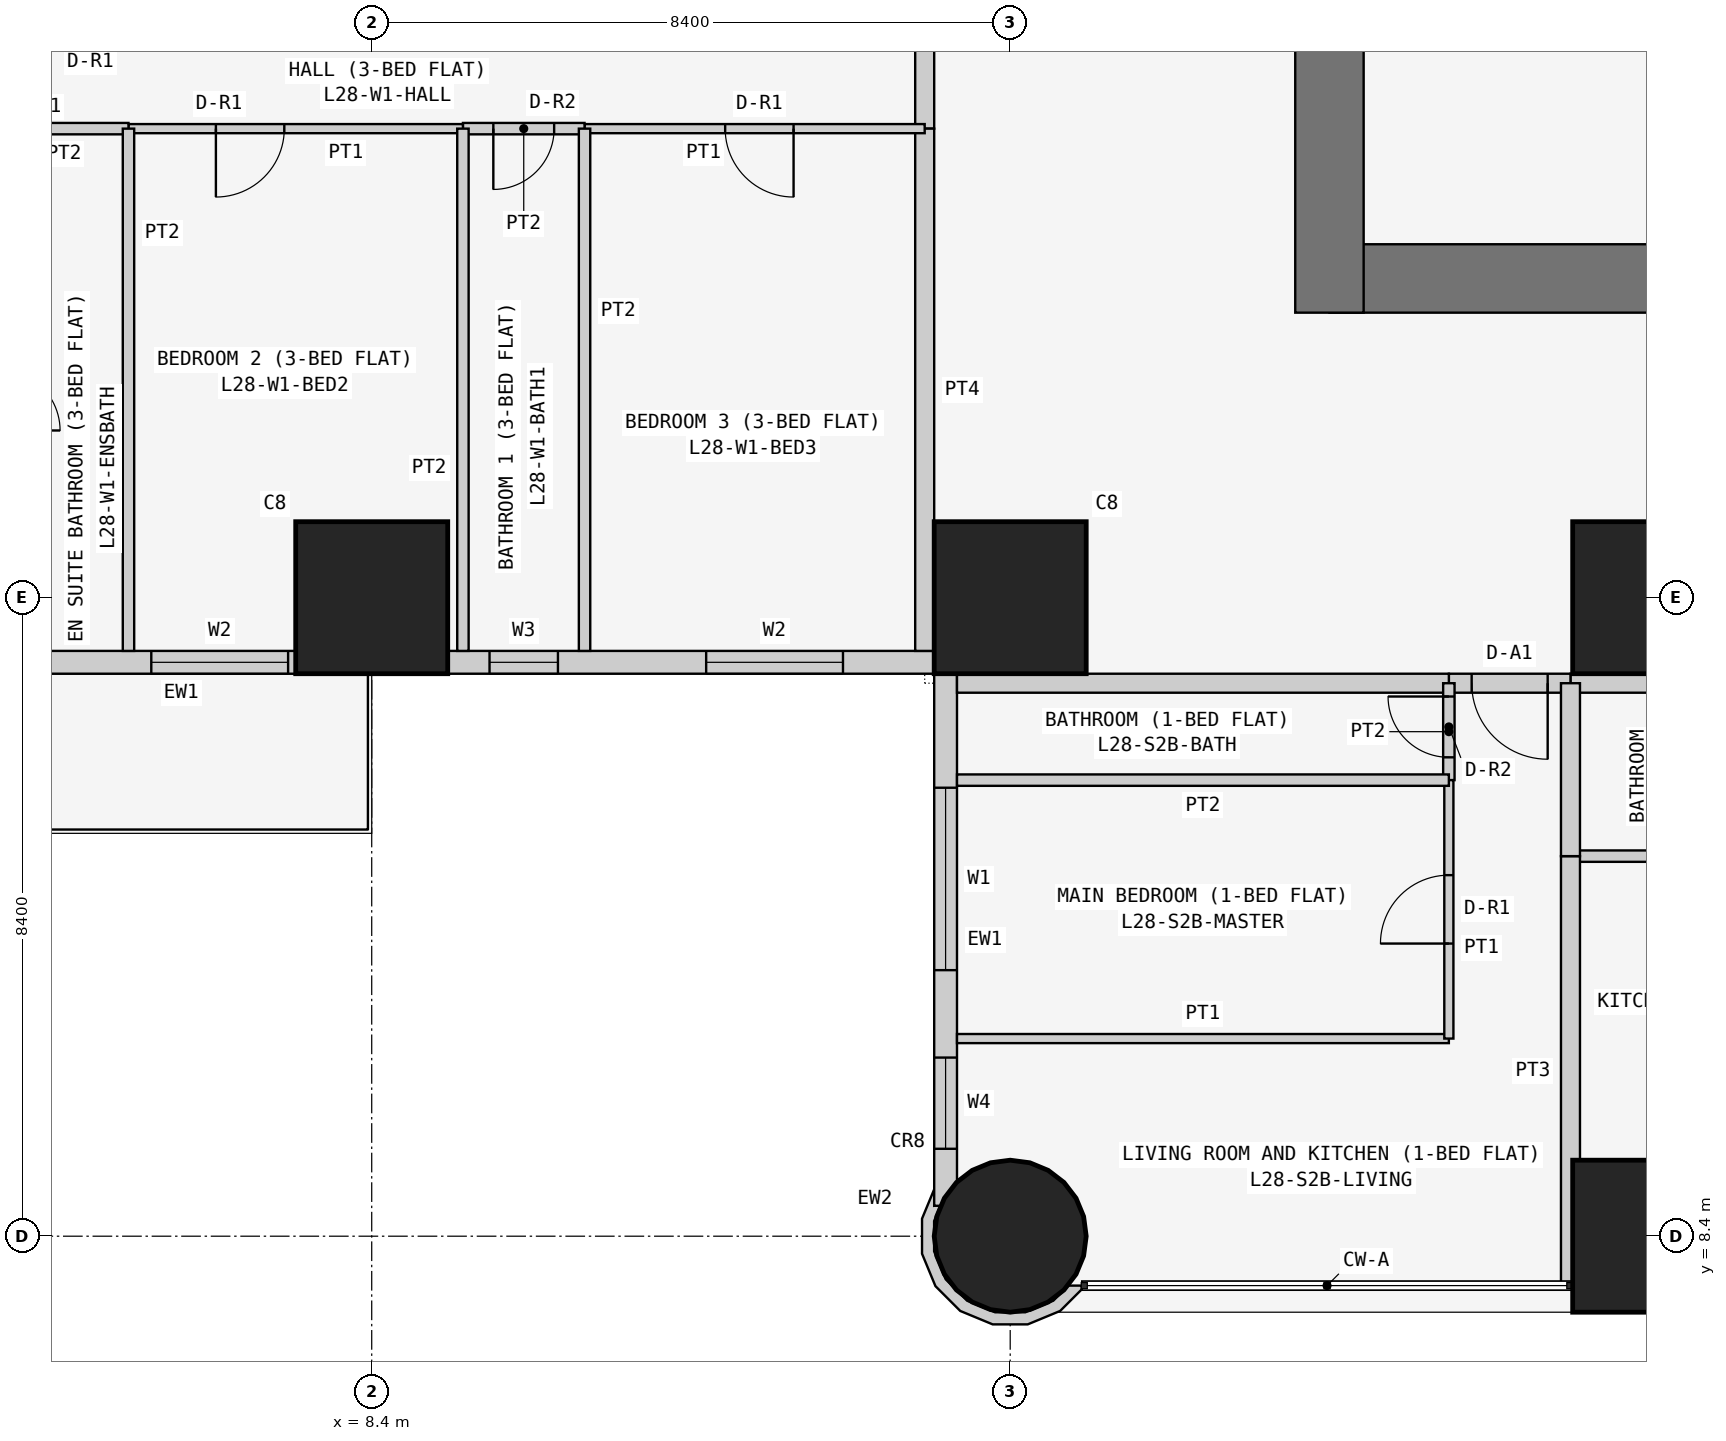
"""IFC4 building model, lengths in metres.
Left out: names, types, materials, properties, quantities, classifications, styles, units other than length and angle.
Written with IfcOpenShell. Run it as: python <this file> out.ifc"""

import sys

from ifc_helpers import new_model, si_unit, direction, frame, frame_2d, origin, origin_2d, place, context, subcontext, project, spatial, polyline, rectangle, circle, outline, extrude, element, fill, save


model = new_model("IFC4")
c1 = context("Model", 3, precision=1e-05, world=origin(), true_north=direction((0.0, 1.0)))
c2 = subcontext(c1, "Body", "Model", "MODEL_VIEW")
j1 = project(units=[si_unit("LENGTHUNIT", "METRE"), si_unit("PLANEANGLEUNIT", "RADIAN")], contexts=[c1])
p1 = place(None, origin())
s1 = spatial("IfcSite", under=j1, at=p1, CompositionType="ELEMENT")
p2 = place(p1, origin())
s2 = spatial("IfcBuilding", under=s1, at=p2, CompositionType="ELEMENT")
p3 = place(p2, frame((0.0, 0.0, 112.5)))
s3 = spatial("IfcBuildingStorey", under=s2, at=p3, CompositionType="ELEMENT", Elevation=112.5)
p4 = place(p3, frame((8.4, 16.8, 0.0), z_axis=(0.0, 0.0, 1.0), x_axis=(1.0, 0.0, 0.0)))
e1 = element("IfcColumn", 1, at=p4, inside=s3, PredefinedType="COLUMN", context=c2, shape_type="SweptSolid", body=[
    extrude(rectangle(XDim=2.0, YDim=2.0, at=origin_2d()), origin(), (0.0, 0.0, 1.0), 3.6),
])
p5 = place(p3, frame((16.8, 8.4, 0.0), z_axis=(0.0, 0.0, 1.0), x_axis=(1.0, 0.0, 0.0)))
e2 = element("IfcColumn", 2, at=p5, inside=s3, PredefinedType="COLUMN", context=c2, shape_type="SweptSolid", body=[
    extrude(circle(Radius=1.0, at=origin_2d()), origin(), (0.0, 0.0, 1.0), 3.6),
])
for number, where, z_axis, x_axis in (
    (3, (16.8, 16.8, 0.0), (0.0, 0.0, 1.0), (1.0, 0.0, 0.0)),
    (4, (25.2, 8.4, 0.0), (0.0, 0.0, 1.0), (1.0, 0.0, 0.0)),
    (5, (25.2, 16.8, 0.0), (0.0, 0.0, 1.0), (1.0, 0.0, 0.0)),
):
    element("IfcColumn", number, at=place(p3, frame(where, z_axis=z_axis, x_axis=x_axis)), inside=s3, PredefinedType="COLUMN", context=c2, shape_type="SweptSolid", body=[
        extrude(rectangle(XDim=2.0, YDim=2.0, at=origin_2d()), origin(), (0.0, 0.0, 1.0), 3.6),
    ])
p6 = place(p3, frame((21.0, 21.0, 0.0), z_axis=(0.0, 0.0, 1.0), x_axis=(1.0, 0.0, 0.0)))
e6 = element("IfcWall", 6, at=p6, inside=s3, PredefinedType="SHEAR", context=c2, shape_type="SweptSolid", body=[
    extrude(rectangle(XDim=17.25, YDim=0.9, at=frame_2d((8.625, 0.0))), origin(), (0.0, 0.0, 1.0), 3.6),
])
p7 = place(p3, frame((21.0, 37.8, 0.0), z_axis=(0.0, 0.0, 1.0), x_axis=(0.0, -1.0, 0.0)))
e7 = element("IfcWall", 7, at=p7, inside=s3, PredefinedType="SHEAR", context=c2, shape_type="SweptSolid", body=[
    extrude(rectangle(XDim=17.25, YDim=0.9, at=frame_2d((8.625, 0.0))), origin(), (0.0, 0.0, 1.0), 3.6),
])
p8 = place(p7, frame((5.4, 0.0, 0.0)))
e8 = element("IfcOpeningElement", 8, at=p8, cuts=e7, PredefinedType="OPENING", context=c2, shape_type="SweptSolid", body=[
    extrude(rectangle(XDim=1.2, YDim=2.1, at=frame_2d((0.6, 1.05))), frame((0.0, 0.46, 0.0), z_axis=(0.0, -1.0, 0.0), x_axis=(1.0, 0.0, 0.0)), (0.0, 0.0, 1.0), 0.92),
])
p9 = place(p3, frame((0.4, 15.95, 0.0), z_axis=(0.0, 0.0, 1.0), x_axis=(1.0, 0.0, 0.0)))
e9 = element("IfcWall", 9, at=p9, inside=s3, PredefinedType="SOLIDWALL", context=c2, shape_type="SweptSolid", body=[
    extrude(rectangle(XDim=15.7, YDim=0.3, at=frame_2d((7.85, 0.0))), origin(), (0.0, 0.0, 1.0), 3.45),
])
p10 = place(p9, frame((12.4, 0.0, 0.9)))
e10 = element("IfcOpeningElement", 10, at=p10, cuts=e9, PredefinedType="OPENING", context=c2, shape_type="SweptSolid", body=[
    extrude(rectangle(XDim=1.8, YDim=1.5, at=frame_2d((0.9, 0.75))), frame((0.0, 0.16, 0.0), z_axis=(0.0, -1.0, 0.0), x_axis=(1.0, 0.0, 0.0)), (0.0, 0.0, 1.0), 0.32),
])
p11 = place(p9, frame((9.55, 0.0, 1.5)))
e11 = element("IfcOpeningElement", 11, at=p11, cuts=e9, PredefinedType="OPENING", context=c2, shape_type="SweptSolid", body=[
    extrude(rectangle(XDim=0.9, YDim=0.7, at=frame_2d((0.45, 0.35))), frame((0.0, 0.16, 0.0), z_axis=(0.0, -1.0, 0.0), x_axis=(1.0, 0.0, 0.0)), (0.0, 0.0, 1.0), 0.32),
])
p12 = place(p9, frame((5.1, 0.0, 0.9)))
e12 = element("IfcOpeningElement", 12, at=p12, cuts=e9, PredefinedType="OPENING", context=c2, shape_type="SweptSolid", body=[
    extrude(rectangle(XDim=1.8, YDim=1.5, at=frame_2d((0.9, 0.75))), frame((0.0, 0.16, 0.0), z_axis=(0.0, -1.0, 0.0), x_axis=(1.0, 0.0, 0.0)), (0.0, 0.0, 1.0), 0.32),
])
p13 = place(p9, frame((2.0, 0.0, 0.0)))
e13 = element("IfcOpeningElement", 13, at=p13, cuts=e9, PredefinedType="OPENING", context=c2, shape_type="SweptSolid", body=[
    extrude(rectangle(XDim=0.9, YDim=2.4, at=frame_2d((0.45, 1.2))), frame((0.0, 0.16, 0.0), z_axis=(0.0, -1.0, 0.0), x_axis=(1.0, 0.0, 0.0)), (0.0, 0.0, 1.0), 0.32),
])
p14 = place(p9, frame((0.7, 0.0, 0.9)))
e14 = element("IfcOpeningElement", 14, at=p14, cuts=e9, PredefinedType="OPENING", context=c2, shape_type="SweptSolid", body=[
    extrude(rectangle(XDim=1.2, YDim=1.5, at=frame_2d((0.6, 0.75))), frame((0.0, 0.16, 0.0), z_axis=(0.0, -1.0, 0.0), x_axis=(1.0, 0.0, 0.0)), (0.0, 0.0, 1.0), 0.32),
])
p15 = place(p3, frame((15.95, 15.8, 0.0), z_axis=(0.0, 0.0, 1.0), x_axis=(0.0, -1.0, 0.0)))
e15 = element("IfcWall", 15, at=p15, inside=s3, PredefinedType="SOLIDWALL", context=c2, shape_type="SweptSolid", body=[
    extrude(rectangle(XDim=7.0, YDim=0.3, at=frame_2d((3.5, 0.0))), origin(), (0.0, 0.0, 1.0), 3.45),
])
p16 = place(p15, frame((1.5, 0.0, 0.9)))
e16 = element("IfcOpeningElement", 16, at=p16, cuts=e15, PredefinedType="OPENING", context=c2, shape_type="SweptSolid", body=[
    extrude(rectangle(XDim=2.4, YDim=1.5, at=frame_2d((1.2, 0.75))), frame((0.0, 0.16, 0.0), z_axis=(0.0, -1.0, 0.0), x_axis=(1.0, 0.0, 0.0)), (0.0, 0.0, 1.0), 0.32),
])
p17 = place(p15, frame((5.05, 0.0, 0.9)))
e17 = element("IfcOpeningElement", 17, at=p17, cuts=e15, PredefinedType="OPENING", context=c2, shape_type="SweptSolid", body=[
    extrude(rectangle(XDim=1.2, YDim=1.5, at=frame_2d((0.6, 0.75))), frame((0.0, 0.16, 0.0), z_axis=(0.0, -1.0, 0.0), x_axis=(1.0, 0.0, 0.0)), (0.0, 0.0, 1.0), 0.32),
])
p18 = place(p3, frame((15.881, 8.967, 0.0), z_axis=(0.0, 0.0, 1.0), x_axis=(-0.555974394895, -0.831199417842, 0.0)))
e18 = element("IfcWall", 18, at=p18, inside=s3, PredefinedType="SOLIDWALL", context=c2, shape_type="SweptSolid", body=[
    extrude(outline(polyline([(0.075, 2.077), (0.35, 2.022), (0.682, 1.801), (0.903, 1.47), (0.981, 1.08), (0.903, 0.689), (0.682, 0.358), (0.351, 0.137), (0.126, 0.092), (0.184, 0.026), (0.003, -0.095), (0.414, -0.013), (0.797, 0.243), (1.053, 0.627), (1.143, 1.08), (1.053, 1.532), (0.796, 1.916), (0.413, 2.172), (0.017, 2.251), (-0.023, 2.224), (0.075, 2.077)])), origin(), (0.0, 0.0, 1.0), 3.45),
])
p19 = place(p3, frame((26.8, 15.675, 0.0), z_axis=(0.0, 0.0, 1.0), x_axis=(-1.0, 0.0, 0.0)))
e19 = element("IfcWall", 19, at=p19, inside=s3, PredefinedType="PARTITIONING", context=c2, shape_type="SweptSolid", body=[
    extrude(rectangle(XDim=2.629, YDim=0.25, at=frame_2d((1.314, 0.0))), origin(), (0.0, 0.0, 1.0), 3.45),
])
p20 = place(p3, frame((24.171, 15.675, 0.0), z_axis=(0.0, 0.0, 1.0), x_axis=(-1.0, 0.0, 0.0)))
e20 = element("IfcWall", 20, at=p20, inside=s3, PredefinedType="PARTITIONING", context=c2, shape_type="SweptSolid", body=[
    extrude(rectangle(XDim=1.6, YDim=0.25, at=frame_2d((0.8, 0.0))), origin(), (0.0, 0.0, 1.0), 3.45),
])
p21 = place(p20, frame((0.3, 0.0, 0.0)))
e21 = element("IfcOpeningElement", 21, at=p21, cuts=e20, PredefinedType="OPENING", context=c2, shape_type="SweptSolid", body=[
    extrude(rectangle(XDim=1.0, YDim=2.1, at=frame_2d((0.5, 1.05))), frame((0.0, 0.135, 0.0), z_axis=(0.0, -1.0, 0.0), x_axis=(1.0, 0.0, 0.0)), (0.0, 0.0, 1.0), 0.27),
])
p22 = place(p3, frame((22.571, 15.675, 0.0), z_axis=(0.0, 0.0, 1.0), x_axis=(-1.0, 0.0, 0.0)))
e22 = element("IfcWall", 22, at=p22, inside=s3, PredefinedType="PARTITIONING", context=c2, shape_type="SweptSolid", body=[
    extrude(rectangle(XDim=6.471, YDim=0.25, at=frame_2d((3.235, 0.0))), origin(), (0.0, 0.0, 1.0), 3.45),
])
p23 = place(p3, frame((15.675, 22.971, 0.0), z_axis=(0.0, 0.0, 1.0), x_axis=(0.0, 1.0, 0.0)))
e23 = element("IfcWall", 23, at=p23, inside=s3, PredefinedType="PARTITIONING", context=c2, shape_type="SweptSolid", body=[
    extrude(rectangle(XDim=1.2, YDim=0.25, at=frame_2d((0.6, 0.0))), origin(), (0.0, 0.0, 1.0), 3.45),
])
p24 = place(p3, frame((15.675, 16.1, 0.0), z_axis=(0.0, 0.0, 1.0), x_axis=(0.0, 1.0, 0.0)))
e24 = element("IfcWall", 24, at=p24, inside=s3, PredefinedType="PARTITIONING", context=c2, shape_type="SweptSolid", body=[
    extrude(rectangle(XDim=6.871, YDim=0.25, at=frame_2d((3.436, 0.0))), origin(), (0.0, 0.0, 1.0), 3.45),
])
p25 = place(p3, frame((24.171, 13.4, 0.0), z_axis=(0.0, 0.0, 1.0), x_axis=(1.0, 0.0, 0.0)))
e25 = element("IfcWall", 25, at=p25, inside=s3, PredefinedType="PARTITIONING", context=c2, shape_type="SweptSolid", body=[
    extrude(rectangle(XDim=2.629, YDim=0.15, at=frame_2d((1.314, 0.0))), origin(), (0.0, 0.0, 1.0), 3.45),
])
p26 = place(p3, frame((24.171, 7.75, 0.0), z_axis=(0.0, 0.0, 1.0), x_axis=(0.0, 1.0, 0.0)))
e26 = element("IfcWall", 26, at=p26, inside=s3, PredefinedType="PARTITIONING", context=c2, shape_type="SweptSolid", body=[
    extrude(rectangle(XDim=5.65, YDim=0.25, at=frame_2d((2.825, 0.0))), origin(), (0.0, 0.0, 1.0), 3.45),
])
p27 = place(p3, frame((24.171, 13.4, 0.0), z_axis=(0.0, 0.0, 1.0), x_axis=(0.0, 1.0, 0.0)))
e27 = element("IfcWall", 27, at=p27, inside=s3, PredefinedType="PARTITIONING", context=c2, shape_type="SweptSolid", body=[
    extrude(rectangle(XDim=2.275, YDim=0.25, at=frame_2d((1.138, 0.0))), origin(), (0.0, 0.0, 1.0), 3.45),
])
p28 = place(p3, frame((22.571, 14.4, 0.0), z_axis=(0.0, 0.0, 1.0), x_axis=(0.0, 1.0, 0.0)))
e28 = element("IfcWall", 28, at=p28, inside=s3, PredefinedType="PARTITIONING", context=c2, shape_type="SweptSolid", body=[
    extrude(rectangle(XDim=1.275, YDim=0.15, at=frame_2d((0.638, 0.0))), origin(), (0.0, 0.0, 1.0), 3.45),
])
p29 = place(p28, frame((0.3, 0.0, 0.0)))
e29 = element("IfcOpeningElement", 29, at=p29, cuts=e28, PredefinedType="OPENING", context=c2, shape_type="SweptSolid", body=[
    extrude(rectangle(XDim=0.8, YDim=2.1, at=frame_2d((0.4, 1.05))), frame((0.0, 0.085, 0.0), z_axis=(0.0, -1.0, 0.0), x_axis=(1.0, 0.0, 0.0)), (0.0, 0.0, 1.0), 0.17),
])
p30 = place(p3, frame((16.1, 11.0, 0.0), z_axis=(0.0, 0.0, 1.0), x_axis=(1.0, 0.0, 0.0)))
e30 = element("IfcWall", 30, at=p30, inside=s3, PredefinedType="PARTITIONING", context=c2, shape_type="SweptSolid", body=[
    extrude(rectangle(XDim=6.471, YDim=0.12, at=frame_2d((3.235, 0.0))), origin(), (0.0, 0.0, 1.0), 3.45),
])
p31 = place(p3, frame((22.571, 11.0, 0.0), z_axis=(0.0, 0.0, 1.0), x_axis=(0.0, 1.0, 0.0)))
e31 = element("IfcWall", 31, at=p31, inside=s3, PredefinedType="PARTITIONING", context=c2, shape_type="SweptSolid", body=[
    extrude(rectangle(XDim=3.4, YDim=0.12, at=frame_2d((1.7, 0.0))), origin(), (0.0, 0.0, 1.0), 3.45),
])
p32 = place(p31, frame((1.25, 0.0, 0.0)))
e32 = element("IfcOpeningElement", 32, at=p32, cuts=e31, PredefinedType="OPENING", context=c2, shape_type="SweptSolid", body=[
    extrude(rectangle(XDim=0.9, YDim=2.1, at=frame_2d((0.45, 1.05))), frame((0.0, 0.07, 0.0), z_axis=(0.0, -1.0, 0.0), x_axis=(1.0, 0.0, 0.0)), (0.0, 0.0, 1.0), 0.14),
])
p33 = place(p3, frame((22.571, 14.4, 0.0), z_axis=(0.0, 0.0, 1.0), x_axis=(-1.0, 0.0, 0.0)))
e33 = element("IfcWall", 33, at=p33, inside=s3, PredefinedType="PARTITIONING", context=c2, shape_type="SweptSolid", body=[
    extrude(rectangle(XDim=6.471, YDim=0.15, at=frame_2d((3.235, 0.0))), origin(), (0.0, 0.0, 1.0), 3.45),
])
p34 = place(p3, frame((11.2, 22.971, 0.0), z_axis=(0.0, 0.0, 1.0), x_axis=(1.0, 0.0, 0.0)))
e34 = element("IfcWall", 34, at=p34, inside=s3, PredefinedType="PARTITIONING", context=c2, shape_type="SweptSolid", body=[
    extrude(rectangle(XDim=4.475, YDim=0.12, at=frame_2d((2.238, 0.0))), origin(), (0.0, 0.0, 1.0), 3.45),
])
p35 = place(p34, frame((1.85, 0.0, 0.0)))
e35 = element("IfcOpeningElement", 35, at=p35, cuts=e34, PredefinedType="OPENING", context=c2, shape_type="SweptSolid", body=[
    extrude(rectangle(XDim=0.9, YDim=2.1, at=frame_2d((0.45, 1.05))), frame((0.0, 0.07, 0.0), z_axis=(0.0, -1.0, 0.0), x_axis=(1.0, 0.0, 0.0)), (0.0, 0.0, 1.0), 0.14),
])
p36 = place(p3, frame((9.6, 22.971, 0.0), z_axis=(0.0, 0.0, 1.0), x_axis=(1.0, 0.0, 0.0)))
e36 = element("IfcWall", 36, at=p36, inside=s3, PredefinedType="PARTITIONING", context=c2, shape_type="SweptSolid", body=[
    extrude(rectangle(XDim=1.6, YDim=0.15, at=frame_2d((0.8, 0.0))), origin(), (0.0, 0.0, 1.0), 3.45),
])
p37 = place(p36, frame((0.4, 0.0, 0.0)))
e37 = element("IfcOpeningElement", 37, at=p37, cuts=e36, PredefinedType="OPENING", context=c2, shape_type="SweptSolid", body=[
    extrude(rectangle(XDim=0.8, YDim=2.1, at=frame_2d((0.4, 1.05))), frame((0.0, 0.085, 0.0), z_axis=(0.0, -1.0, 0.0), x_axis=(1.0, 0.0, 0.0)), (0.0, 0.0, 1.0), 0.17),
])
p38 = place(p3, frame((5.2, 22.971, 0.0), z_axis=(0.0, 0.0, 1.0), x_axis=(1.0, 0.0, 0.0)))
e38 = element("IfcWall", 38, at=p38, inside=s3, PredefinedType="PARTITIONING", context=c2, shape_type="SweptSolid", body=[
    extrude(rectangle(XDim=4.4, YDim=0.12, at=frame_2d((2.2, 0.0))), origin(), (0.0, 0.0, 1.0), 3.45),
])
p39 = place(p38, frame((1.15, 0.0, 0.0)))
e39 = element("IfcOpeningElement", 39, at=p39, cuts=e38, PredefinedType="OPENING", context=c2, shape_type="SweptSolid", body=[
    extrude(rectangle(XDim=0.9, YDim=2.1, at=frame_2d((0.45, 1.05))), frame((0.0, 0.07, 0.0), z_axis=(0.0, -1.0, 0.0), x_axis=(1.0, 0.0, 0.0)), (0.0, 0.0, 1.0), 0.14),
])
p40 = place(p3, frame((3.5, 22.971, 0.0), z_axis=(0.0, 0.0, 1.0), x_axis=(1.0, 0.0, 0.0)))
e40 = element("IfcWall", 40, at=p40, inside=s3, PredefinedType="PARTITIONING", context=c2, shape_type="SweptSolid", body=[
    extrude(rectangle(XDim=1.7, YDim=0.15, at=frame_2d((0.85, 0.0))), origin(), (0.0, 0.0, 1.0), 3.45),
])
for number, where, z_axis, x_axis in (
    (41, (11.2, 22.971, 0.0), (0.0, 0.0, 1.0), (0.0, -1.0, 0.0)),
    (42, (9.6, 22.971, 0.0), (0.0, 0.0, 1.0), (0.0, -1.0, 0.0)),
    (43, (5.2, 22.971, 0.0), (0.0, 0.0, 1.0), (0.0, -1.0, 0.0)),
):
    element("IfcWall", number, at=place(p3, frame(where, z_axis=z_axis, x_axis=x_axis)), inside=s3, PredefinedType="PARTITIONING", context=c2, shape_type="SweptSolid", body=[
        extrude(rectangle(XDim=6.871, YDim=0.15, at=frame_2d((3.436, 0.0))), origin(), (0.0, 0.0, 1.0), 3.45),
    ])
p41 = place(p16, origin())
e44 = element("IfcWindow", 44, at=p41, inside=s3, PartitioningType="SINGLE_PANEL", PredefinedType="WINDOW", context=c2, shape_type="SweptSolid", body=[
    extrude(rectangle(XDim=2.4, YDim=1.5, at=frame_2d((1.2, 0.75))), frame((0.0, 0.03, 0.0), z_axis=(0.0, -1.0, 0.0), x_axis=(1.0, 0.0, 0.0)), (0.0, 0.0, 1.0), 0.06),
])
fill(e16, e44)
p42 = place(p17, origin())
e45 = element("IfcWindow", 45, at=p42, inside=s3, PartitioningType="SINGLE_PANEL", PredefinedType="WINDOW", context=c2, shape_type="SweptSolid", body=[
    extrude(rectangle(XDim=1.2, YDim=1.5, at=frame_2d((0.6, 0.75))), frame((0.0, 0.03, 0.0), z_axis=(0.0, -1.0, 0.0), x_axis=(1.0, 0.0, 0.0)), (0.0, 0.0, 1.0), 0.06),
])
fill(e17, e45)
p43 = place(p10, origin())
e46 = element("IfcWindow", 46, at=p43, inside=s3, PartitioningType="SINGLE_PANEL", PredefinedType="WINDOW", context=c2, shape_type="SweptSolid", body=[
    extrude(rectangle(XDim=1.8, YDim=1.5, at=frame_2d((0.9, 0.75))), frame((0.0, 0.03, 0.0), z_axis=(0.0, -1.0, 0.0), x_axis=(1.0, 0.0, 0.0)), (0.0, 0.0, 1.0), 0.06),
])
fill(e10, e46)
p44 = place(p11, origin())
e47 = element("IfcWindow", 47, at=p44, inside=s3, PartitioningType="SINGLE_PANEL", PredefinedType="WINDOW", context=c2, shape_type="SweptSolid", body=[
    extrude(rectangle(XDim=0.9, YDim=0.7, at=frame_2d((0.45, 0.35))), frame((0.0, 0.03, 0.0), z_axis=(0.0, -1.0, 0.0), x_axis=(1.0, 0.0, 0.0)), (0.0, 0.0, 1.0), 0.06),
])
fill(e11, e47)
p45 = place(p12, origin())
e48 = element("IfcWindow", 48, at=p45, inside=s3, PartitioningType="SINGLE_PANEL", PredefinedType="WINDOW", context=c2, shape_type="SweptSolid", body=[
    extrude(rectangle(XDim=1.8, YDim=1.5, at=frame_2d((0.9, 0.75))), frame((0.0, 0.03, 0.0), z_axis=(0.0, -1.0, 0.0), x_axis=(1.0, 0.0, 0.0)), (0.0, 0.0, 1.0), 0.06),
])
fill(e12, e48)
p46 = place(p21, origin())
e49 = element("IfcDoor", 49, at=p46, inside=s3, OperationType="SINGLE_SWING_LEFT", PredefinedType="DOOR", context=c2, shape_type="SweptSolid", body=[
    extrude(rectangle(XDim=1.0, YDim=2.1, at=frame_2d((0.5, 1.05))), frame((0.0, 0.025, 0.0), z_axis=(0.0, -1.0, 0.0), x_axis=(1.0, 0.0, 0.0)), (0.0, 0.0, 1.0), 0.05),
])
fill(e21, e49)
p47 = place(p29, origin())
e50 = element("IfcDoor", 50, at=p47, inside=s3, OperationType="SINGLE_SWING_RIGHT", PredefinedType="DOOR", context=c2, shape_type="SweptSolid", body=[
    extrude(rectangle(XDim=0.8, YDim=2.1, at=frame_2d((0.4, 1.05))), frame((0.0, 0.025, 0.0), z_axis=(0.0, -1.0, 0.0), x_axis=(1.0, 0.0, 0.0)), (0.0, 0.0, 1.0), 0.05),
])
fill(e29, e50)
p48 = place(p32, origin())
e51 = element("IfcDoor", 51, at=p48, inside=s3, OperationType="SINGLE_SWING_LEFT", PredefinedType="DOOR", context=c2, shape_type="SweptSolid", body=[
    extrude(rectangle(XDim=0.9, YDim=2.1, at=frame_2d((0.45, 1.05))), frame((0.0, 0.025, 0.0), z_axis=(0.0, -1.0, 0.0), x_axis=(1.0, 0.0, 0.0)), (0.0, 0.0, 1.0), 0.05),
])
fill(e32, e51)
p49 = place(p35, frame((0.9, 0.0, 0.0), z_axis=(0.0, 0.0, 1.0), x_axis=(-1.0, 0.0, 0.0)))
e52 = element("IfcDoor", 52, at=p49, inside=s3, OperationType="SINGLE_SWING_LEFT", PredefinedType="DOOR", context=c2, shape_type="SweptSolid", body=[
    extrude(rectangle(XDim=0.9, YDim=2.1, at=frame_2d((0.45, 1.05))), frame((0.0, 0.025, 0.0), z_axis=(0.0, -1.0, 0.0), x_axis=(1.0, 0.0, 0.0)), (0.0, 0.0, 1.0), 0.05),
])
fill(e35, e52)
p50 = place(p37, frame((0.8, 0.0, 0.0), z_axis=(0.0, 0.0, 1.0), x_axis=(-1.0, 0.0, 0.0)))
e53 = element("IfcDoor", 53, at=p50, inside=s3, OperationType="SINGLE_SWING_RIGHT", PredefinedType="DOOR", context=c2, shape_type="SweptSolid", body=[
    extrude(rectangle(XDim=0.8, YDim=2.1, at=frame_2d((0.4, 1.05))), frame((0.0, 0.025, 0.0), z_axis=(0.0, -1.0, 0.0), x_axis=(1.0, 0.0, 0.0)), (0.0, 0.0, 1.0), 0.05),
])
fill(e37, e53)
p51 = place(p39, frame((0.9, 0.0, 0.0), z_axis=(0.0, 0.0, 1.0), x_axis=(-1.0, 0.0, 0.0)))
e54 = element("IfcDoor", 54, at=p51, inside=s3, OperationType="SINGLE_SWING_RIGHT", PredefinedType="DOOR", context=c2, shape_type="SweptSolid", body=[
    extrude(rectangle(XDim=0.9, YDim=2.1, at=frame_2d((0.45, 1.05))), frame((0.0, 0.025, 0.0), z_axis=(0.0, -1.0, 0.0), x_axis=(1.0, 0.0, 0.0)), (0.0, 0.0, 1.0), 0.05),
])
fill(e39, e54)
save(model, sys.argv[1])
